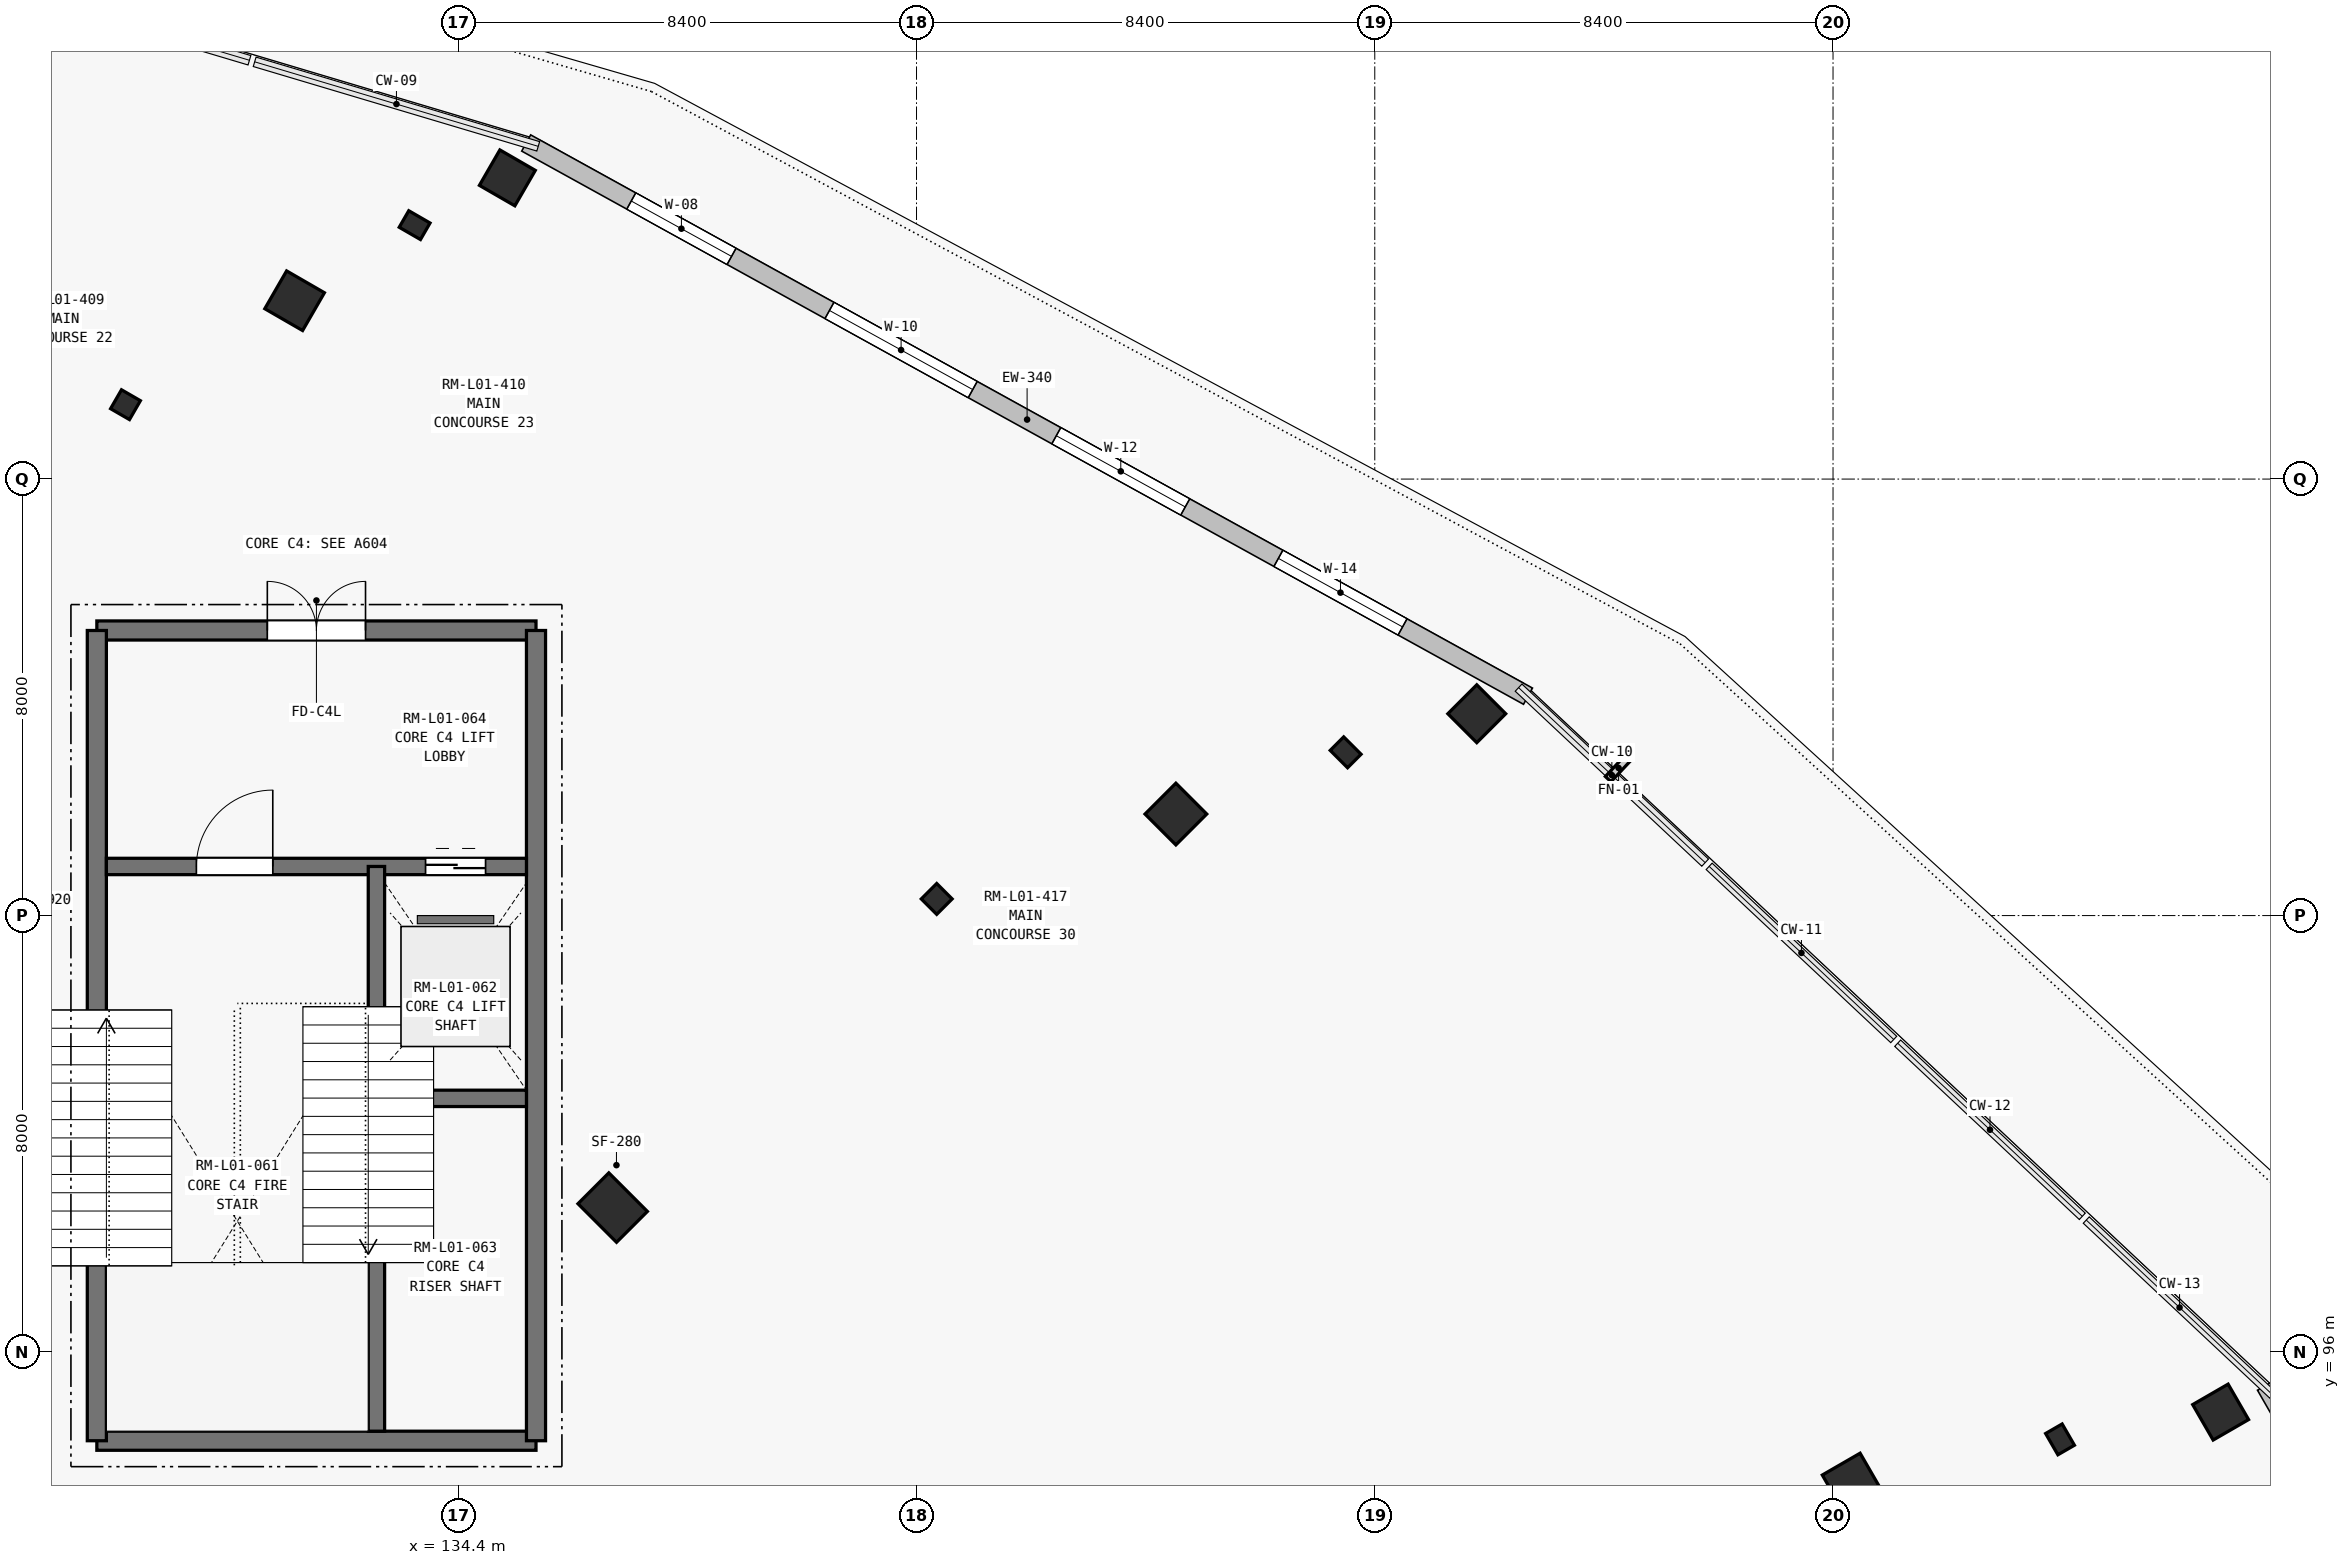
"""IFC4 building model, lengths in metres.
Left out: names, types, materials, properties, quantities, classifications, styles, units other than length and angle.
Written with IfcOpenShell. Run it as: python <this file> out.ifc"""

import sys

from ifc_helpers import new_model, si_unit, direction, frame, frame_2d, origin, origin_2d, place, context, subcontext, project, spatial, rectangle, i_section, extrude, element, fill, save


model = new_model("IFC4")
c1 = context("Model", 3, precision=1e-05, world=origin(), true_north=direction((0.0, 1.0)))
c2 = subcontext(c1, "Body", "Model", "MODEL_VIEW")
j1 = project(units=[si_unit("LENGTHUNIT", "METRE"), si_unit("PLANEANGLEUNIT", "RADIAN")], contexts=[c1])
p1 = place(None, origin())
s1 = spatial("IfcSite", under=j1, at=p1, CompositionType="ELEMENT")
p2 = place(p1, origin())
s2 = spatial("IfcBuilding", under=s1, at=p2, CompositionType="ELEMENT")
p3 = place(p2, frame((0.0, 0.0, 5.4)))
s3 = spatial("IfcBuildingStorey", under=s2, at=p3, CompositionType="ELEMENT", Elevation=5.4)
p4 = place(p3, frame((137.231, 98.648, 0.0), z_axis=(0.0, 0.0, 1.0), x_axis=(0.707106781187, 0.707106781187, 0.0)))
e1 = element("IfcColumn", 1, at=p4, inside=s3, PredefinedType="COLUMN", context=c2, shape_type="SweptSolid", body=[
    extrude(rectangle(XDim=0.8, YDim=1.0, at=origin_2d()), origin(), (0.0, 0.0, 1.0), 4.5),
])
for number, where, z_axis, x_axis in (
    (2, (143.17, 104.305, 0.0), (0.0, 0.0, 1.0), (0.707, 0.707, 0.0)),
    (3, (128.3, 113.363, 0.0), (0.0, 0.0, 1.0), (0.5, 0.866, 0.0)),
):
    element("IfcColumn", number, at=place(p3, frame(where, z_axis=z_axis, x_axis=x_axis)), inside=s3, PredefinedType="COLUMN", context=c2, shape_type="SweptSolid", body=[
        extrude(i_section(OverallWidth=0.4, OverallDepth=0.4, WebThickness=0.018, FlangeThickness=0.032, at=origin_2d()), origin(), (0.0, 0.0, 1.0), 4.5),
    ])
for number, where, z_axis, x_axis in (
    (4, (159.95, 93.6, 0.0), (0.0, 0.0, 1.0), (0.866, 0.5, 0.0)),
    (5, (147.554, 105.861, 0.0), (0.0, 0.0, 1.0), (0.707, 0.707, 0.0)),
    (6, (131.4, 115.269, 0.0), (0.0, 0.0, 1.0), (0.5, 0.866, 0.0)),
):
    element("IfcColumn", number, at=place(p3, frame(where, z_axis=z_axis, x_axis=x_axis)), inside=s3, PredefinedType="COLUMN", context=c2, shape_type="SweptSolid", body=[
        extrude(rectangle(XDim=0.8, YDim=0.8, at=origin_2d()), origin(), (0.0, 0.0, 1.0), 4.5),
    ])
for number, where, z_axis, x_axis in (
    (7, (166.705, 94.9, 0.0), (0.0, 0.0, 1.0), (0.866, 0.5, 0.0)),
    (8, (153.07, 107.699, 0.0), (0.0, 0.0, 1.0), (0.707, 0.707, 0.0)),
    (9, (135.3, 117.521, 0.0), (0.0, 0.0, 1.0), (0.5, 0.866, 0.0)),
):
    element("IfcColumn", number, at=place(p3, frame(where, z_axis=z_axis, x_axis=x_axis)), inside=s3, PredefinedType="COLUMN", context=c2, shape_type="SweptSolid", body=[
        extrude(rectangle(XDim=0.75, YDim=0.75, at=origin_2d()), origin(), (0.0, 0.0, 1.0), 4.25),
    ])
for number, where, z_axis, x_axis in (
    (10, (163.761, 94.4, 0.0), (0.0, 0.0, 1.0), (0.866, 0.5, 0.0)),
    (11, (150.666, 106.992, 0.0), (0.0, 0.0, 1.0), (0.707, 0.707, 0.0)),
    (12, (133.6, 116.654, 0.0), (0.0, 0.0, 1.0), (0.5, 0.866, 0.0)),
):
    element("IfcColumn", number, at=place(p3, frame(where, z_axis=z_axis, x_axis=x_axis)), inside=s3, PredefinedType="PILASTER", context=c2, shape_type="SweptSolid", body=[
        extrude(rectangle(XDim=0.35, YDim=0.45, at=origin_2d()), origin(), (0.0, 0.0, 1.0), 4.5),
    ])
p5 = place(p3, frame((135.645, 118.16, 0.0), z_axis=(0.0, 0.0, 1.0), x_axis=(0.875430127379, -0.483344692821, 0.0)))
e13 = element("IfcWall", 13, at=p5, inside=s3, PredefinedType="SOLIDWALL", context=c2, shape_type="SweptSolid", body=[
    extrude(rectangle(XDim=20.977, YDim=0.34, at=frame_2d((10.488, 0.0))), origin(), (0.0, 0.0, 1.0), 4.25),
])
p6 = place(p5, frame((2.2, 0.0, 0.9)))
e14 = element("IfcOpeningElement", 14, at=p6, cuts=e13, PredefinedType="OPENING", context=c2, shape_type="SweptSolid", body=[
    extrude(rectangle(XDim=2.1, YDim=2.0, at=frame_2d((1.05, 1.0))), frame((0.0, 0.18, 0.0), z_axis=(0.0, -1.0, 0.0), x_axis=(1.0, 0.0, 0.0)), (0.0, 0.0, 1.0), 0.36),
])
p7 = place(p5, frame((6.35, 0.0, 0.9)))
e15 = element("IfcOpeningElement", 15, at=p7, cuts=e13, PredefinedType="OPENING", context=c2, shape_type="SweptSolid", body=[
    extrude(rectangle(XDim=3.0, YDim=1.6, at=frame_2d((1.5, 0.8))), frame((0.0, 0.18, 0.0), z_axis=(0.0, -1.0, 0.0), x_axis=(1.0, 0.0, 0.0)), (0.0, 0.0, 1.0), 0.36),
])
p8 = place(p5, frame((11.1, 0.0, 0.9)))
e16 = element("IfcOpeningElement", 16, at=p8, cuts=e13, PredefinedType="OPENING", context=c2, shape_type="SweptSolid", body=[
    extrude(rectangle(XDim=2.7, YDim=1.55, at=frame_2d((1.35, 0.775))), frame((0.0, 0.18, 0.0), z_axis=(0.0, -1.0, 0.0), x_axis=(1.0, 0.0, 0.0)), (0.0, 0.0, 1.0), 0.36),
])
p9 = place(p5, frame((15.75, 0.0, 0.9)))
e17 = element("IfcOpeningElement", 17, at=p9, cuts=e13, PredefinedType="OPENING", context=c2, shape_type="SweptSolid", body=[
    extrude(rectangle(XDim=2.6, YDim=1.4, at=frame_2d((1.3, 0.7))), frame((0.0, 0.18, 0.0), z_axis=(0.0, -1.0, 0.0), x_axis=(1.0, 0.0, 0.0)), (0.0, 0.0, 1.0), 0.36),
])
p10 = place(p3, frame((167.517, 95.38, 0.0), z_axis=(0.0, 0.0, 1.0), x_axis=(0.4988947801, -0.866662563163, 0.0)))
e18 = element("IfcWall", 18, at=p10, inside=s3, PredefinedType="SOLIDWALL", context=c2, shape_type="SweptSolid", body=[
    extrude(rectangle(XDim=17.786, YDim=0.315, at=frame_2d((8.893, 0.0))), origin(), (0.0, 0.0, 1.0), 4.25),
])
p11 = place(p10, frame((1.9, 0.0, 0.9)))
e19 = element("IfcOpeningElement", 19, at=p11, cuts=e18, PredefinedType="OPENING", context=c2, shape_type="SweptSolid", body=[
    extrude(rectangle(XDim=2.7, YDim=1.55, at=frame_2d((1.35, 0.775))), frame((0.0, 0.167, 0.0), z_axis=(0.0, -1.0, 0.0), x_axis=(1.0, 0.0, 0.0)), (0.0, 0.0, 1.0), 0.335),
])
p12 = place(p10, frame((6.55, 0.0, 0.9)))
e20 = element("IfcOpeningElement", 20, at=p12, cuts=e18, PredefinedType="OPENING", context=c2, shape_type="SweptSolid", body=[
    extrude(rectangle(XDim=2.6, YDim=1.4, at=frame_2d((1.3, 0.7))), frame((0.0, 0.167, 0.0), z_axis=(0.0, -1.0, 0.0), x_axis=(1.0, 0.0, 0.0)), (0.0, 0.0, 1.0), 0.335),
])
p13 = place(p10, frame((11.3, 0.0, 0.9)))
e21 = element("IfcOpeningElement", 21, at=p13, cuts=e18, PredefinedType="OPENING", context=c2, shape_type="SweptSolid", body=[
    extrude(rectangle(XDim=2.3, YDim=1.3, at=frame_2d((1.15, 0.65))), frame((0.0, 0.167, 0.0), z_axis=(0.0, -1.0, 0.0), x_axis=(1.0, 0.0, 0.0)), (0.0, 0.0, 1.0), 0.335),
])
p14 = place(p3, frame((127.775, 94.375, 0.0), z_axis=(0.0, 0.0, 1.0), x_axis=(1.0, 0.0, 0.0)))
e22 = element("IfcWall", 22, at=p14, inside=s3, PredefinedType="SHEAR", context=c2, shape_type="SweptSolid", body=[
    extrude(rectangle(XDim=8.05, YDim=0.35, at=frame_2d((4.025, 0.0))), origin(), (0.0, 0.0, 1.0), 4.5),
])
p15 = place(p3, frame((127.775, 109.225, 0.0), z_axis=(0.0, 0.0, 1.0), x_axis=(1.0, 0.0, 0.0)))
e23 = element("IfcWall", 23, at=p15, inside=s3, PredefinedType="SHEAR", context=c2, shape_type="SweptSolid", body=[
    extrude(rectangle(XDim=8.05, YDim=0.35, at=frame_2d((4.025, 0.0))), origin(), (0.0, 0.0, 1.0), 4.5),
])
p16 = place(p15, frame((3.125, 0.0, 0.0)))
e24 = element("IfcOpeningElement", 24, at=p16, cuts=e23, PredefinedType="OPENING", context=c2, shape_type="SweptSolid", body=[
    extrude(rectangle(XDim=1.8, YDim=2.25, at=frame_2d((0.9, 1.125))), frame((0.0, 0.185, 0.0), z_axis=(0.0, -1.0, 0.0), x_axis=(1.0, 0.0, 0.0)), (0.0, 0.0, 1.0), 0.37),
])
for number, where, z_axis, x_axis in (
    (25, (127.775, 94.375, 0.0), (0.0, 0.0, 1.0), (0.0, 1.0, 0.0)),
    (26, (135.825, 94.375, 0.0), (0.0, 0.0, 1.0), (0.0, 1.0, 0.0)),
):
    element("IfcWall", number, at=place(p3, frame(where, z_axis=z_axis, x_axis=x_axis)), inside=s3, PredefinedType="SHEAR", context=c2, shape_type="SweptSolid", body=[
        extrude(rectangle(XDim=14.85, YDim=0.35, at=frame_2d((7.425, 0.0))), origin(), (0.0, 0.0, 1.0), 4.5),
    ])
p17 = place(p3, frame((127.95, 104.9, 0.0), z_axis=(0.0, 0.0, 1.0), x_axis=(1.0, 0.0, 0.0)))
e27 = element("IfcWall", 27, at=p17, inside=s3, PredefinedType="SHEAR", context=c2, shape_type="SweptSolid", body=[
    extrude(rectangle(XDim=7.7, YDim=0.3, at=frame_2d((3.85, 0.0))), origin(), (0.0, 0.0, 1.0), 4.5),
])
p18 = place(p17, frame((1.65, 0.0, 0.0)))
e28 = element("IfcOpeningElement", 28, at=p18, cuts=e27, PredefinedType="OPENING", context=c2, shape_type="SweptSolid", body=[
    extrude(rectangle(XDim=1.4, YDim=2.2, at=frame_2d((0.7, 1.1))), frame((0.0, 0.16, 0.0), z_axis=(0.0, -1.0, 0.0), x_axis=(1.0, 0.0, 0.0)), (0.0, 0.0, 1.0), 0.32),
])
p19 = place(p17, frame((5.85, 0.0, 0.0)))
e29 = element("IfcOpeningElement", 29, at=p19, cuts=e27, PredefinedType="OPENING", context=c2, shape_type="SweptSolid", body=[
    extrude(rectangle(XDim=1.1, YDim=2.2, at=frame_2d((0.55, 1.1))), frame((0.0, 0.16, 0.0), z_axis=(0.0, -1.0, 0.0), x_axis=(1.0, 0.0, 0.0)), (0.0, 0.0, 1.0), 0.32),
])
p20 = place(p3, frame((132.9, 94.55, 0.0), z_axis=(0.0, 0.0, 1.0), x_axis=(0.0, 1.0, 0.0)))
e30 = element("IfcWall", 30, at=p20, inside=s3, PredefinedType="SHEAR", context=c2, shape_type="SweptSolid", body=[
    extrude(rectangle(XDim=10.35, YDim=0.3, at=frame_2d((5.175, 0.0))), origin(), (0.0, 0.0, 1.0), 4.5),
])
p21 = place(p3, frame((133.05, 100.65, 0.0), z_axis=(0.0, 0.0, 1.0), x_axis=(1.0, 0.0, 0.0)))
e31 = element("IfcWall", 31, at=p21, inside=s3, PredefinedType="SHEAR", context=c2, shape_type="SweptSolid", body=[
    extrude(rectangle(XDim=2.6, YDim=0.3, at=frame_2d((1.3, 0.0))), origin(), (0.0, 0.0, 1.0), 4.5),
])
p22 = place(p6, origin())
e32 = element("IfcWindow", 32, at=p22, inside=s3, PartitioningType="SINGLE_PANEL", PredefinedType="WINDOW", context=c2, shape_type="SweptSolid", body=[
    extrude(rectangle(XDim=2.1, YDim=2.0, at=frame_2d((1.05, 1.0))), frame((0.0, 0.03, 0.0), z_axis=(0.0, -1.0, 0.0), x_axis=(1.0, 0.0, 0.0)), (0.0, 0.0, 1.0), 0.06),
])
fill(e14, e32)
p23 = place(p7, origin())
e33 = element("IfcWindow", 33, at=p23, inside=s3, PartitioningType="SINGLE_PANEL", PredefinedType="WINDOW", context=c2, shape_type="SweptSolid", body=[
    extrude(rectangle(XDim=3.0, YDim=1.6, at=frame_2d((1.5, 0.8))), frame((0.0, 0.03, 0.0), z_axis=(0.0, -1.0, 0.0), x_axis=(1.0, 0.0, 0.0)), (0.0, 0.0, 1.0), 0.06),
])
fill(e15, e33)
p24 = place(p8, origin())
e34 = element("IfcWindow", 34, at=p24, inside=s3, PartitioningType="SINGLE_PANEL", PredefinedType="WINDOW", context=c2, shape_type="SweptSolid", body=[
    extrude(rectangle(XDim=2.7, YDim=1.55, at=frame_2d((1.35, 0.775))), frame((0.0, 0.03, 0.0), z_axis=(0.0, -1.0, 0.0), x_axis=(1.0, 0.0, 0.0)), (0.0, 0.0, 1.0), 0.06),
])
fill(e16, e34)
p25 = place(p9, origin())
e35 = element("IfcWindow", 35, at=p25, inside=s3, PartitioningType="SINGLE_PANEL", PredefinedType="WINDOW", context=c2, shape_type="SweptSolid", body=[
    extrude(rectangle(XDim=2.6, YDim=1.4, at=frame_2d((1.3, 0.7))), frame((0.0, 0.03, 0.0), z_axis=(0.0, -1.0, 0.0), x_axis=(1.0, 0.0, 0.0)), (0.0, 0.0, 1.0), 0.06),
])
fill(e17, e35)
p26 = place(p16, origin())
e36 = element("IfcDoor", 36, at=p26, inside=s3, OperationType="DOUBLE_DOOR_SINGLE_SWING", PredefinedType="DOOR", context=c2, shape_type="SweptSolid", body=[
    extrude(rectangle(XDim=1.8, YDim=2.25, at=frame_2d((0.9, 1.125))), frame((0.0, 0.025, 0.0), z_axis=(0.0, -1.0, 0.0), x_axis=(1.0, 0.0, 0.0)), (0.0, 0.0, 1.0), 0.05),
])
fill(e24, e36)
p27 = place(p18, origin())
e37 = element("IfcDoor", 37, at=p27, inside=s3, OperationType="SINGLE_SWING_RIGHT", PredefinedType="DOOR", context=c2, shape_type="SweptSolid", body=[
    extrude(rectangle(XDim=1.4, YDim=2.2, at=frame_2d((0.7, 1.1))), frame((0.0, 0.025, 0.0), z_axis=(0.0, -1.0, 0.0), x_axis=(1.0, 0.0, 0.0)), (0.0, 0.0, 1.0), 0.05),
])
fill(e28, e37)
p28 = place(p19, origin())
e38 = element("IfcDoor", 38, at=p28, inside=s3, OperationType="SLIDING_TO_LEFT", PredefinedType="DOOR", context=c2, shape_type="SweptSolid", body=[
    extrude(rectangle(XDim=1.1, YDim=2.2, at=frame_2d((0.55, 1.1))), frame((0.0, 0.025, 0.0), z_axis=(0.0, -1.0, 0.0), x_axis=(1.0, 0.0, 0.0)), (0.0, 0.0, 1.0), 0.05),
])
fill(e29, e38)
save(model, sys.argv[1])
